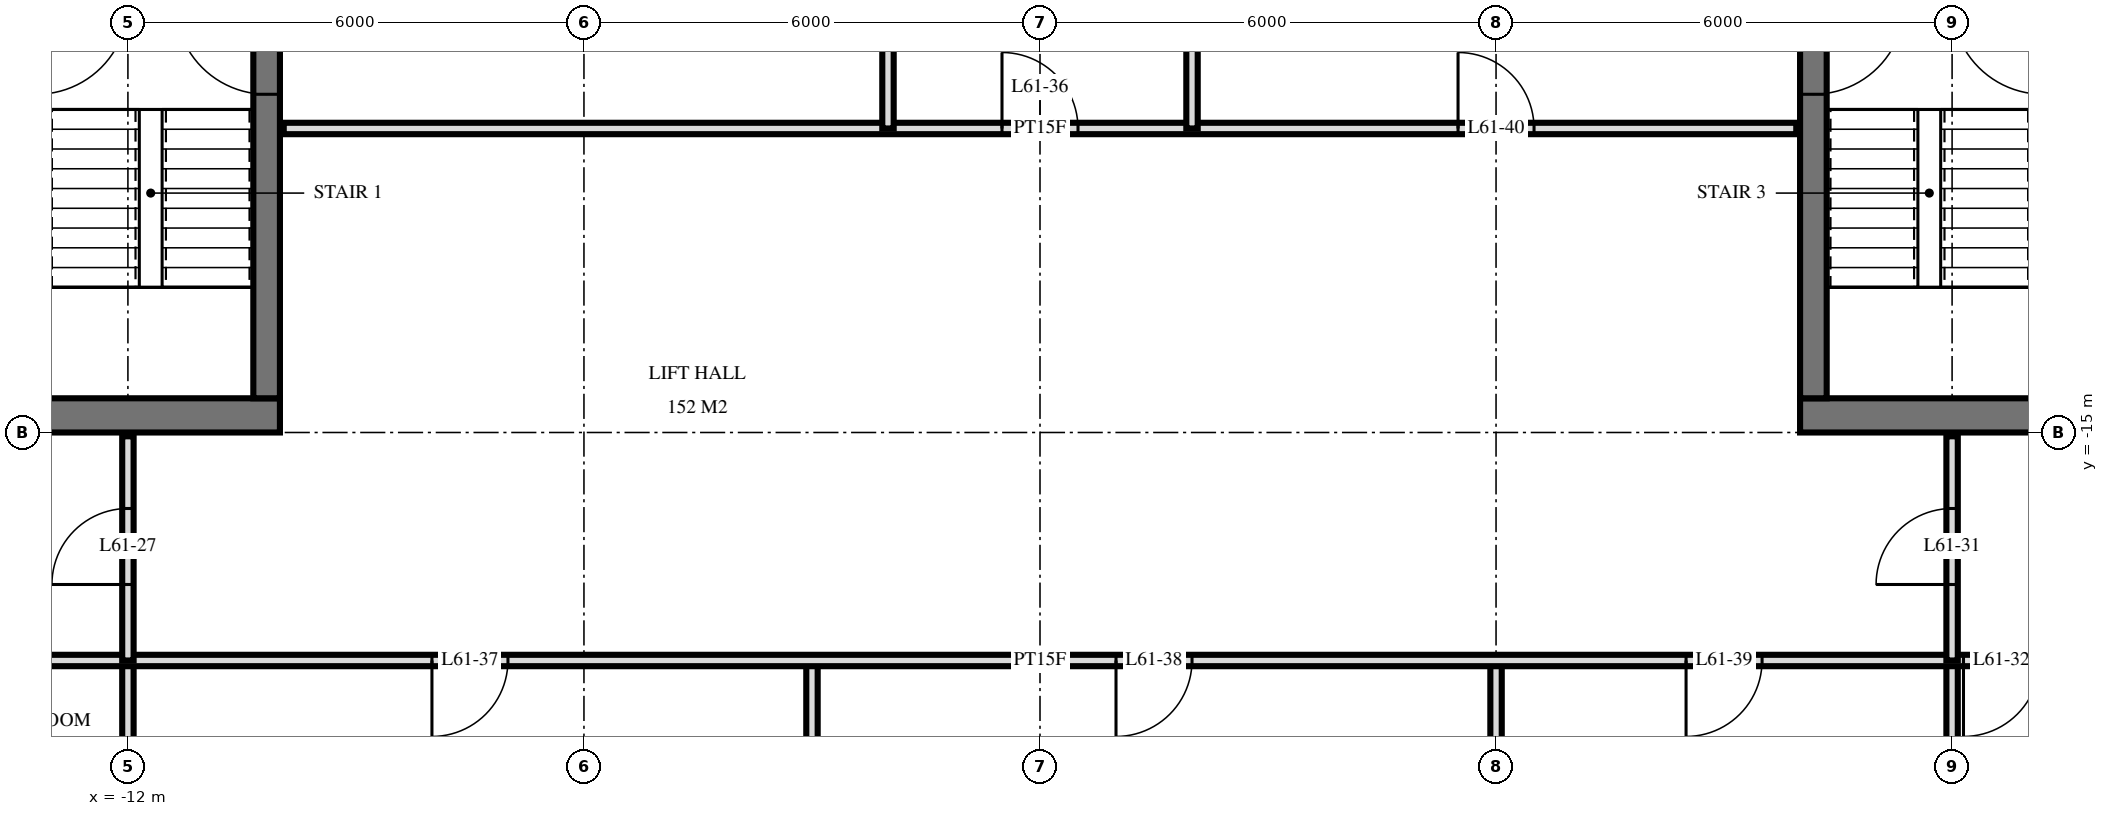
"""IFC4 building model, lengths in metres.
Left out: names, types, materials, properties, quantities, classifications, styles, units other than length and angle.
Written with IfcOpenShell. Run it as: python <this file> out.ifc"""

import sys

from ifc_helpers import new_model, si_unit, direction, frame, frame_2d, origin, place, context, subcontext, project, spatial, rectangle, extrude, element, fill, save


model = new_model("IFC4")
c1 = context("Model", 3, precision=1e-05, world=origin(), true_north=direction((0.0, 1.0)))
c2 = subcontext(c1, "Body", "Model", "MODEL_VIEW")
j1 = project(units=[si_unit("LENGTHUNIT", "METRE"), si_unit("PLANEANGLEUNIT", "RADIAN")], contexts=[c1])
p1 = place(None, origin())
s1 = spatial("IfcSite", under=j1, at=p1, CompositionType="ELEMENT")
p2 = place(p1, origin())
s2 = spatial("IfcBuilding", under=s1, at=p2, CompositionType="ELEMENT")
p3 = place(p2, frame((0.0, 0.0, 232.6)))
s3 = spatial("IfcBuildingStorey", under=s2, at=p3, CompositionType="ELEMENT", Elevation=232.6)
p4 = place(p3, frame((-24.5, -14.775, 0.0), z_axis=(0.0, 0.0, 1.0), x_axis=(1.0, 0.0, 0.0)))
e1 = element("IfcWall", 1, at=p4, inside=s3, PredefinedType="SHEAR", context=c2, shape_type="SweptSolid", body=[
    extrude(rectangle(XDim=14.5, YDim=0.45, at=frame_2d((7.25, 0.0))), origin(), (0.0, 0.0, 1.0), 3.5),
])
p5 = place(p4, frame((6.2, 0.0, 0.0)))
e2 = element("IfcOpeningElement", 2, at=p5, cuts=e1, PredefinedType="OPENING", context=c2, shape_type="SweptSolid", body=[
    extrude(rectangle(XDim=1.2, YDim=2.1, at=frame_2d((0.6, 1.05))), frame((0.0, 0.235, 0.0), z_axis=(0.0, -1.0, 0.0), x_axis=(1.0, 0.0, 0.0)), (0.0, 0.0, 1.0), 0.47),
])
p6 = place(p4, frame((9.25, 0.0, 0.0)))
e3 = element("IfcOpeningElement", 3, at=p6, cuts=e1, PredefinedType="OPENING", context=c2, shape_type="SweptSolid", body=[
    extrude(rectangle(XDim=1.1, YDim=2.1, at=frame_2d((0.55, 1.05))), frame((0.0, 0.235, 0.0), z_axis=(0.0, -1.0, 0.0), x_axis=(1.0, 0.0, 0.0)), (0.0, 0.0, 1.0), 0.47),
])
p7 = place(p4, frame((3.5, 0.0, 0.0)))
e4 = element("IfcOpeningElement", 4, at=p7, cuts=e1, PredefinedType="OPENING", context=c2, shape_type="SweptSolid", body=[
    extrude(rectangle(XDim=0.9, YDim=2.1, at=frame_2d((0.45, 1.05))), frame((0.0, 0.235, 0.0), z_axis=(0.0, -1.0, 0.0), x_axis=(1.0, 0.0, 0.0)), (0.0, 0.0, 1.0), 0.47),
])
p8 = place(p4, frame((1.05, 0.0, 0.0)))
e5 = element("IfcOpeningElement", 5, at=p8, cuts=e1, PredefinedType="OPENING", context=c2, shape_type="SweptSolid", body=[
    extrude(rectangle(XDim=1.0, YDim=2.1, at=frame_2d((0.5, 1.05))), frame((0.0, 0.235, 0.0), z_axis=(0.0, -1.0, 0.0), x_axis=(1.0, 0.0, 0.0)), (0.0, 0.0, 1.0), 0.47),
])
p9 = place(p3, frame((-10.175, -14.55, 0.0), z_axis=(0.0, 0.0, 1.0), x_axis=(0.0, 1.0, 0.0)))
e6 = element("IfcWall", 6, at=p9, inside=s3, PredefinedType="SHEAR", context=c2, shape_type="SweptSolid", body=[
    extrude(rectangle(XDim=14.1, YDim=0.35, at=frame_2d((7.05, 0.0))), origin(), (0.0, 0.0, 1.0), 3.5),
])
p10 = place(p9, frame((8.4, 0.0, 0.0)))
e7 = element("IfcOpeningElement", 7, at=p10, cuts=e6, PredefinedType="OPENING", context=c2, shape_type="SweptSolid", body=[
    extrude(rectangle(XDim=1.4, YDim=2.4, at=frame_2d((0.7, 1.2))), frame((0.0, 0.185, 0.0), z_axis=(0.0, -1.0, 0.0), x_axis=(1.0, 0.0, 0.0)), (0.0, 0.0, 1.0), 0.37),
])
p11 = place(p9, frame((10.0, 0.0, 0.0)))
e8 = element("IfcOpeningElement", 8, at=p11, cuts=e6, PredefinedType="OPENING", context=c2, shape_type="SweptSolid", body=[
    extrude(rectangle(XDim=1.4, YDim=2.4, at=frame_2d((0.7, 1.2))), frame((0.0, 0.185, 0.0), z_axis=(0.0, -1.0, 0.0), x_axis=(1.0, 0.0, 0.0)), (0.0, 0.0, 1.0), 0.37),
])
p12 = place(p9, frame((4.0, 0.0, 0.0)))
e9 = element("IfcOpeningElement", 9, at=p12, cuts=e6, PredefinedType="OPENING", context=c2, shape_type="SweptSolid", body=[
    extrude(rectangle(XDim=1.2, YDim=2.1, at=frame_2d((0.6, 1.05))), frame((0.0, 0.185, 0.0), z_axis=(0.0, -1.0, 0.0), x_axis=(1.0, 0.0, 0.0)), (0.0, 0.0, 1.0), 0.37),
])
p13 = place(p3, frame((10.0, -14.775, 0.0), z_axis=(0.0, 0.0, 1.0), x_axis=(1.0, 0.0, 0.0)))
e10 = element("IfcWall", 10, at=p13, inside=s3, PredefinedType="SHEAR", context=c2, shape_type="SweptSolid", body=[
    extrude(rectangle(XDim=14.5, YDim=0.45, at=frame_2d((7.25, 0.0))), origin(), (0.0, 0.0, 1.0), 3.5),
])
p14 = place(p13, frame((7.1, 0.0, 0.0)))
e11 = element("IfcOpeningElement", 11, at=p14, cuts=e10, PredefinedType="OPENING", context=c2, shape_type="SweptSolid", body=[
    extrude(rectangle(XDim=1.2, YDim=2.1, at=frame_2d((0.6, 1.05))), frame((0.0, 0.235, 0.0), z_axis=(0.0, -1.0, 0.0), x_axis=(1.0, 0.0, 0.0)), (0.0, 0.0, 1.0), 0.47),
])
p15 = place(p13, frame((4.15, 0.0, 0.0)))
e12 = element("IfcOpeningElement", 12, at=p15, cuts=e10, PredefinedType="OPENING", context=c2, shape_type="SweptSolid", body=[
    extrude(rectangle(XDim=1.1, YDim=2.1, at=frame_2d((0.55, 1.05))), frame((0.0, 0.235, 0.0), z_axis=(0.0, -1.0, 0.0), x_axis=(1.0, 0.0, 0.0)), (0.0, 0.0, 1.0), 0.47),
])
p16 = place(p13, frame((10.1, 0.0, 0.0)))
e13 = element("IfcOpeningElement", 13, at=p16, cuts=e10, PredefinedType="OPENING", context=c2, shape_type="SweptSolid", body=[
    extrude(rectangle(XDim=0.9, YDim=2.1, at=frame_2d((0.45, 1.05))), frame((0.0, 0.235, 0.0), z_axis=(0.0, -1.0, 0.0), x_axis=(1.0, 0.0, 0.0)), (0.0, 0.0, 1.0), 0.47),
])
p17 = place(p13, frame((12.45, 0.0, 0.0)))
e14 = element("IfcOpeningElement", 14, at=p17, cuts=e10, PredefinedType="OPENING", context=c2, shape_type="SweptSolid", body=[
    extrude(rectangle(XDim=1.0, YDim=2.1, at=frame_2d((0.5, 1.05))), frame((0.0, 0.235, 0.0), z_axis=(0.0, -1.0, 0.0), x_axis=(1.0, 0.0, 0.0)), (0.0, 0.0, 1.0), 0.47),
])
p18 = place(p3, frame((10.175, -14.55, 0.0), z_axis=(0.0, 0.0, 1.0), x_axis=(0.0, 1.0, 0.0)))
e15 = element("IfcWall", 15, at=p18, inside=s3, PredefinedType="SHEAR", context=c2, shape_type="SweptSolid", body=[
    extrude(rectangle(XDim=14.1, YDim=0.35, at=frame_2d((7.05, 0.0))), origin(), (0.0, 0.0, 1.0), 3.5),
])
p19 = place(p18, frame((8.4, 0.0, 0.0)))
e16 = element("IfcOpeningElement", 16, at=p19, cuts=e15, PredefinedType="OPENING", context=c2, shape_type="SweptSolid", body=[
    extrude(rectangle(XDim=1.4, YDim=2.4, at=frame_2d((0.7, 1.2))), frame((0.0, 0.185, 0.0), z_axis=(0.0, -1.0, 0.0), x_axis=(1.0, 0.0, 0.0)), (0.0, 0.0, 1.0), 0.37),
])
p20 = place(p18, frame((10.0, 0.0, 0.0)))
e17 = element("IfcOpeningElement", 17, at=p20, cuts=e15, PredefinedType="OPENING", context=c2, shape_type="SweptSolid", body=[
    extrude(rectangle(XDim=1.4, YDim=2.4, at=frame_2d((0.7, 1.2))), frame((0.0, 0.185, 0.0), z_axis=(0.0, -1.0, 0.0), x_axis=(1.0, 0.0, 0.0)), (0.0, 0.0, 1.0), 0.37),
])
p21 = place(p18, frame((4.0, 0.0, 0.0)))
e18 = element("IfcOpeningElement", 18, at=p21, cuts=e15, PredefinedType="OPENING", context=c2, shape_type="SweptSolid", body=[
    extrude(rectangle(XDim=1.2, YDim=2.1, at=frame_2d((0.6, 1.05))), frame((0.0, 0.185, 0.0), z_axis=(0.0, -1.0, 0.0), x_axis=(1.0, 0.0, 0.0)), (0.0, 0.0, 1.0), 0.37),
])
p22 = place(p3, frame((12.0, -18.0, 0.0), z_axis=(0.0, 0.0, 1.0), x_axis=(0.0, 1.0, 0.0)))
e19 = element("IfcWall", 19, at=p22, inside=s3, PredefinedType="PARTITIONING", context=c2, shape_type="SweptSolid", body=[
    extrude(rectangle(XDim=2.95, YDim=0.15, at=frame_2d((1.475, 0.0))), origin(), (0.0, 0.0, 1.0), 3.22),
])
p23 = place(p22, frame((1.0, 0.0, 0.0)))
e20 = element("IfcOpeningElement", 20, at=p23, cuts=e19, PredefinedType="OPENING", context=c2, shape_type="SweptSolid", body=[
    extrude(rectangle(XDim=1.0, YDim=2.1, at=frame_2d((0.5, 1.05))), frame((0.0, 0.085, 0.0), z_axis=(0.0, -1.0, 0.0), x_axis=(1.0, 0.0, 0.0)), (0.0, 0.0, 1.0), 0.17),
])
for number, where, z_axis, x_axis in (
    (21, (12.0, -29.22, 0.0), (0.0, 0.0, 1.0), (0.0, 1.0, 0.0)),
    (22, (6.0, -29.22, 0.0), (0.0, 0.0, 1.0), (0.0, 1.0, 0.0)),
):
    element("IfcWall", number, at=place(p3, frame(where, z_axis=z_axis, x_axis=x_axis)), inside=s3, PredefinedType="PARTITIONING", context=c2, shape_type="SweptSolid", body=[
        extrude(rectangle(XDim=11.22, YDim=0.15, at=frame_2d((5.61, 0.0))), origin(), (0.0, 0.0, 1.0), 3.22),
    ])
for number, where, z_axis, x_axis in (
    (23, (2.0, -11.0, 0.0), (0.0, 0.0, 1.0), (0.0, 1.0, 0.0)),
    (24, (-2.0, -11.0, 0.0), (0.0, 0.0, 1.0), (0.0, 1.0, 0.0)),
):
    element("IfcWall", number, at=place(p3, frame(where, z_axis=z_axis, x_axis=x_axis)), inside=s3, PredefinedType="PARTITIONING", context=c2, shape_type="SweptSolid", body=[
        extrude(rectangle(XDim=4.0, YDim=0.15, at=frame_2d((2.0, 0.0))), origin(), (0.0, 0.0, 1.0), 3.22),
    ])
p24 = place(p3, frame((-3.0, -29.22, 0.0), z_axis=(0.0, 0.0, 1.0), x_axis=(0.0, 1.0, 0.0)))
e25 = element("IfcWall", 25, at=p24, inside=s3, PredefinedType="PARTITIONING", context=c2, shape_type="SweptSolid", body=[
    extrude(rectangle(XDim=11.22, YDim=0.15, at=frame_2d((5.61, 0.0))), origin(), (0.0, 0.0, 1.0), 3.22),
])
p25 = place(p3, frame((-12.0, -18.0, 0.0), z_axis=(0.0, 0.0, 1.0), x_axis=(0.0, 1.0, 0.0)))
e26 = element("IfcWall", 26, at=p25, inside=s3, PredefinedType="PARTITIONING", context=c2, shape_type="SweptSolid", body=[
    extrude(rectangle(XDim=2.95, YDim=0.15, at=frame_2d((1.475, 0.0))), origin(), (0.0, 0.0, 1.0), 3.22),
])
p26 = place(p25, frame((1.0, 0.0, 0.0)))
e27 = element("IfcOpeningElement", 27, at=p26, cuts=e26, PredefinedType="OPENING", context=c2, shape_type="SweptSolid", body=[
    extrude(rectangle(XDim=1.0, YDim=2.1, at=frame_2d((0.5, 1.05))), frame((0.0, 0.085, 0.0), z_axis=(0.0, -1.0, 0.0), x_axis=(1.0, 0.0, 0.0)), (0.0, 0.0, 1.0), 0.17),
])
p27 = place(p3, frame((-12.0, -29.22, 0.0), z_axis=(0.0, 0.0, 1.0), x_axis=(0.0, 1.0, 0.0)))
e28 = element("IfcWall", 28, at=p27, inside=s3, PredefinedType="PARTITIONING", context=c2, shape_type="SweptSolid", body=[
    extrude(rectangle(XDim=11.22, YDim=0.15, at=frame_2d((5.61, 0.0))), origin(), (0.0, 0.0, 1.0), 3.22),
])
p28 = place(p3, frame((-26.82, -18.0, 0.0), z_axis=(0.0, 0.0, 1.0), x_axis=(1.0, 0.0, 0.0)))
e29 = element("IfcWall", 29, at=p28, inside=s3, PredefinedType="PARTITIONING", context=c2, shape_type="SweptSolid", body=[
    extrude(rectangle(XDim=53.64, YDim=0.15, at=frame_2d((26.82, 0.0))), origin(), (0.0, 0.0, 1.0), 3.22),
])
p29 = place(p28, frame((4.92, 0.0, 0.0)))
e30 = element("IfcOpeningElement", 30, at=p29, cuts=e29, PredefinedType="OPENING", context=c2, shape_type="SweptSolid", body=[
    extrude(rectangle(XDim=1.0, YDim=2.1, at=frame_2d((0.5, 1.05))), frame((0.0, 0.085, 0.0), z_axis=(0.0, -1.0, 0.0), x_axis=(1.0, 0.0, 0.0)), (0.0, 0.0, 1.0), 0.17),
])
p30 = place(p28, frame((1.62, 0.0, 0.0)))
e31 = element("IfcOpeningElement", 31, at=p30, cuts=e29, PredefinedType="OPENING", context=c2, shape_type="SweptSolid", body=[
    extrude(rectangle(XDim=1.0, YDim=2.1, at=frame_2d((0.5, 1.05))), frame((0.0, 0.085, 0.0), z_axis=(0.0, -1.0, 0.0), x_axis=(1.0, 0.0, 0.0)), (0.0, 0.0, 1.0), 0.17),
])
p31 = place(p28, frame((38.97, 0.0, 0.0)))
e32 = element("IfcOpeningElement", 32, at=p31, cuts=e29, PredefinedType="OPENING", context=c2, shape_type="SweptSolid", body=[
    extrude(rectangle(XDim=1.0, YDim=2.1, at=frame_2d((0.5, 1.05))), frame((0.0, 0.085, 0.0), z_axis=(0.0, -1.0, 0.0), x_axis=(1.0, 0.0, 0.0)), (0.0, 0.0, 1.0), 0.17),
])
p32 = place(p28, frame((48.72, 0.0, 0.0)))
e33 = element("IfcOpeningElement", 33, at=p32, cuts=e29, PredefinedType="OPENING", context=c2, shape_type="SweptSolid", body=[
    extrude(rectangle(XDim=1.0, YDim=2.1, at=frame_2d((0.5, 1.05))), frame((0.0, 0.085, 0.0), z_axis=(0.0, -1.0, 0.0), x_axis=(1.0, 0.0, 0.0)), (0.0, 0.0, 1.0), 0.17),
])
p33 = place(p28, frame((46.92, 0.0, 0.0)))
e34 = element("IfcOpeningElement", 34, at=p33, cuts=e29, PredefinedType="OPENING", context=c2, shape_type="SweptSolid", body=[
    extrude(rectangle(XDim=1.0, YDim=2.1, at=frame_2d((0.5, 1.05))), frame((0.0, 0.085, 0.0), z_axis=(0.0, -1.0, 0.0), x_axis=(1.0, 0.0, 0.0)), (0.0, 0.0, 1.0), 0.17),
])
p34 = place(p28, frame((18.82, 0.0, 0.0)))
e35 = element("IfcOpeningElement", 35, at=p34, cuts=e29, PredefinedType="OPENING", context=c2, shape_type="SweptSolid", body=[
    extrude(rectangle(XDim=1.0, YDim=2.1, at=frame_2d((0.5, 1.05))), frame((0.0, 0.085, 0.0), z_axis=(0.0, -1.0, 0.0), x_axis=(1.0, 0.0, 0.0)), (0.0, 0.0, 1.0), 0.17),
])
p35 = place(p28, frame((27.82, 0.0, 0.0)))
e36 = element("IfcOpeningElement", 36, at=p35, cuts=e29, PredefinedType="OPENING", context=c2, shape_type="SweptSolid", body=[
    extrude(rectangle(XDim=1.0, YDim=2.1, at=frame_2d((0.5, 1.05))), frame((0.0, 0.085, 0.0), z_axis=(0.0, -1.0, 0.0), x_axis=(1.0, 0.0, 0.0)), (0.0, 0.0, 1.0), 0.17),
])
p36 = place(p28, frame((35.32, 0.0, 0.0)))
e37 = element("IfcOpeningElement", 37, at=p36, cuts=e29, PredefinedType="OPENING", context=c2, shape_type="SweptSolid", body=[
    extrude(rectangle(XDim=1.0, YDim=2.1, at=frame_2d((0.5, 1.05))), frame((0.0, 0.085, 0.0), z_axis=(0.0, -1.0, 0.0), x_axis=(1.0, 0.0, 0.0)), (0.0, 0.0, 1.0), 0.17),
])
p37 = place(p3, frame((-9.95, -11.0, 0.0), z_axis=(0.0, 0.0, 1.0), x_axis=(1.0, 0.0, 0.0)))
e38 = element("IfcWall", 38, at=p37, inside=s3, PredefinedType="PARTITIONING", context=c2, shape_type="SweptSolid", body=[
    extrude(rectangle(XDim=19.9, YDim=0.15, at=frame_2d((9.95, 0.0))), origin(), (0.0, 0.0, 1.0), 3.22),
])
p38 = place(p37, frame((9.45, 0.0, 0.0)))
e39 = element("IfcOpeningElement", 39, at=p38, cuts=e38, PredefinedType="OPENING", context=c2, shape_type="SweptSolid", body=[
    extrude(rectangle(XDim=1.0, YDim=2.1, at=frame_2d((0.5, 1.05))), frame((0.0, 0.085, 0.0), z_axis=(0.0, -1.0, 0.0), x_axis=(1.0, 0.0, 0.0)), (0.0, 0.0, 1.0), 0.17),
])
p39 = place(p37, frame((15.45, 0.0, 0.0)))
e40 = element("IfcOpeningElement", 40, at=p39, cuts=e38, PredefinedType="OPENING", context=c2, shape_type="SweptSolid", body=[
    extrude(rectangle(XDim=1.0, YDim=2.1, at=frame_2d((0.5, 1.05))), frame((0.0, 0.085, 0.0), z_axis=(0.0, -1.0, 0.0), x_axis=(1.0, 0.0, 0.0)), (0.0, 0.0, 1.0), 0.17),
])
p40 = place(p12, origin())
e41 = element("IfcDoor", 41, at=p40, inside=s3, OperationType="SINGLE_SWING_LEFT", PredefinedType="DOOR", context=c2, shape_type="SweptSolid", body=[
    extrude(rectangle(XDim=1.2, YDim=2.1, at=frame_2d((0.6, 1.05))), frame((0.0, 0.025, 0.0), z_axis=(0.0, -1.0, 0.0), x_axis=(1.0, 0.0, 0.0)), (0.0, 0.0, 1.0), 0.05),
])
fill(e9, e41)
p41 = place(p21, frame((0.6, 0.0, 0.0), z_axis=(0.0, 0.0, 1.0), x_axis=(-1.0, 0.0, 0.0)))
e42 = element("IfcDoor", 42, at=p41, inside=s3, OperationType="SINGLE_SWING_RIGHT", PredefinedType="DOOR", context=c2, shape_type="SweptSolid", body=[
    extrude(rectangle(XDim=1.2, YDim=2.1, at=frame_2d((0.0, 1.05))), frame((0.0, -0.025, 0.0), z_axis=(0.0, 1.0, 0.0), x_axis=(-1.0, 0.0, 0.0)), (0.0, 0.0, 1.0), 0.05),
])
fill(e18, e42)
p42 = place(p26, origin())
e43 = element("IfcDoor", 43, at=p42, inside=s3, OperationType="SINGLE_SWING_RIGHT", PredefinedType="DOOR", context=c2, shape_type="SweptSolid", body=[
    extrude(rectangle(XDim=1.0, YDim=2.1, at=frame_2d((0.5, 1.05))), frame((0.0, 0.025, 0.0), z_axis=(0.0, -1.0, 0.0), x_axis=(1.0, 0.0, 0.0)), (0.0, 0.0, 1.0), 0.05),
])
fill(e27, e43)
p43 = place(p23, origin())
e44 = element("IfcDoor", 44, at=p43, inside=s3, OperationType="SINGLE_SWING_RIGHT", PredefinedType="DOOR", context=c2, shape_type="SweptSolid", body=[
    extrude(rectangle(XDim=1.0, YDim=2.1, at=frame_2d((0.5, 1.05))), frame((0.0, 0.025, 0.0), z_axis=(0.0, -1.0, 0.0), x_axis=(1.0, 0.0, 0.0)), (0.0, 0.0, 1.0), 0.05),
])
fill(e20, e44)
p44 = place(p31, frame((0.5, 0.0, 0.0), z_axis=(0.0, 0.0, 1.0), x_axis=(-1.0, 0.0, 0.0)))
e45 = element("IfcDoor", 45, at=p44, inside=s3, OperationType="SINGLE_SWING_LEFT", PredefinedType="DOOR", context=c2, shape_type="SweptSolid", body=[
    extrude(rectangle(XDim=1.0, YDim=2.1, at=frame_2d((0.0, 1.05))), frame((0.0, -0.025, 0.0), z_axis=(0.0, 1.0, 0.0), x_axis=(-1.0, 0.0, 0.0)), (0.0, 0.0, 1.0), 0.05),
])
fill(e32, e45)
p45 = place(p38, origin())
e46 = element("IfcDoor", 46, at=p45, inside=s3, OperationType="SINGLE_SWING_RIGHT", PredefinedType="DOOR", context=c2, shape_type="SweptSolid", body=[
    extrude(rectangle(XDim=1.0, YDim=2.1, at=frame_2d((0.5, 1.05))), frame((0.0, 0.025, 0.0), z_axis=(0.0, -1.0, 0.0), x_axis=(1.0, 0.0, 0.0)), (0.0, 0.0, 1.0), 0.05),
])
fill(e39, e46)
p46 = place(p34, frame((0.5, 0.0, 0.0), z_axis=(0.0, 0.0, 1.0), x_axis=(-1.0, 0.0, 0.0)))
e47 = element("IfcDoor", 47, at=p46, inside=s3, OperationType="SINGLE_SWING_LEFT", PredefinedType="DOOR", context=c2, shape_type="SweptSolid", body=[
    extrude(rectangle(XDim=1.0, YDim=2.1, at=frame_2d((0.0, 1.05))), frame((0.0, -0.025, 0.0), z_axis=(0.0, 1.0, 0.0), x_axis=(-1.0, 0.0, 0.0)), (0.0, 0.0, 1.0), 0.05),
])
fill(e35, e47)
p47 = place(p35, frame((0.5, 0.0, 0.0), z_axis=(0.0, 0.0, 1.0), x_axis=(-1.0, 0.0, 0.0)))
e48 = element("IfcDoor", 48, at=p47, inside=s3, OperationType="SINGLE_SWING_LEFT", PredefinedType="DOOR", context=c2, shape_type="SweptSolid", body=[
    extrude(rectangle(XDim=1.0, YDim=2.1, at=frame_2d((0.0, 1.05))), frame((0.0, -0.025, 0.0), z_axis=(0.0, 1.0, 0.0), x_axis=(-1.0, 0.0, 0.0)), (0.0, 0.0, 1.0), 0.05),
])
fill(e36, e48)
p48 = place(p36, frame((0.5, 0.0, 0.0), z_axis=(0.0, 0.0, 1.0), x_axis=(-1.0, 0.0, 0.0)))
e49 = element("IfcDoor", 49, at=p48, inside=s3, OperationType="SINGLE_SWING_LEFT", PredefinedType="DOOR", context=c2, shape_type="SweptSolid", body=[
    extrude(rectangle(XDim=1.0, YDim=2.1, at=frame_2d((0.0, 1.05))), frame((0.0, -0.025, 0.0), z_axis=(0.0, 1.0, 0.0), x_axis=(-1.0, 0.0, 0.0)), (0.0, 0.0, 1.0), 0.05),
])
fill(e37, e49)
p49 = place(p39, origin())
e50 = element("IfcDoor", 50, at=p49, inside=s3, OperationType="SINGLE_SWING_RIGHT", PredefinedType="DOOR", context=c2, shape_type="SweptSolid", body=[
    extrude(rectangle(XDim=1.0, YDim=2.1, at=frame_2d((0.5, 1.05))), frame((0.0, 0.025, 0.0), z_axis=(0.0, -1.0, 0.0), x_axis=(1.0, 0.0, 0.0)), (0.0, 0.0, 1.0), 0.05),
])
fill(e40, e50)
save(model, sys.argv[1])
